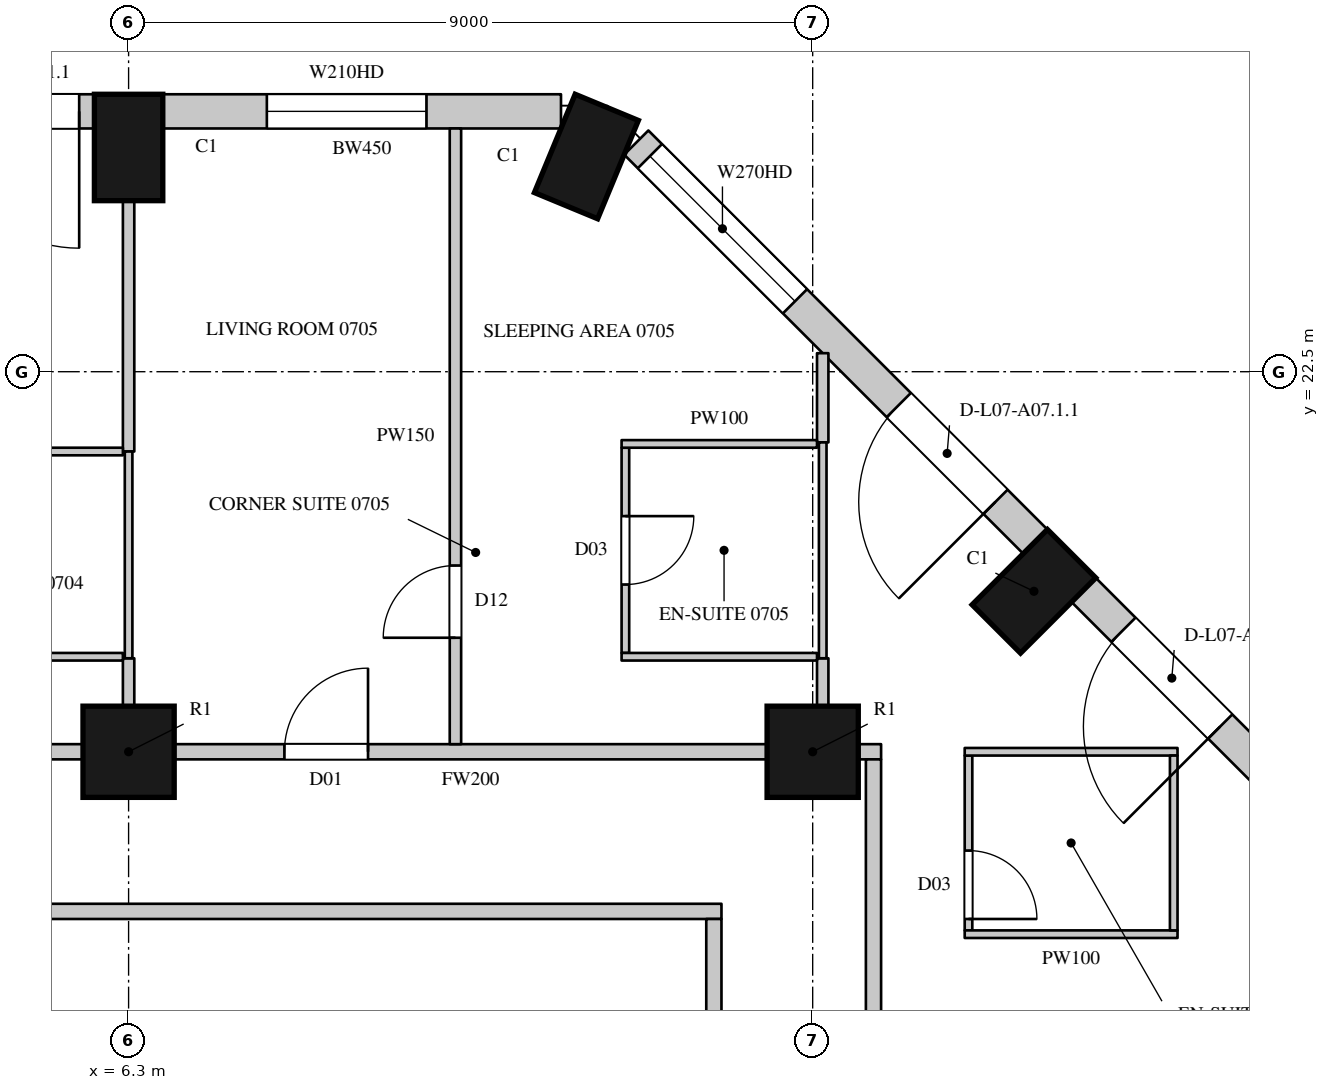
"""IFC4 building model, lengths in metres.
Left out: names, types, materials, properties, quantities, classifications, styles, units other than length and angle.
Written with IfcOpenShell. Run it as: python <this file> out.ifc"""

import sys

from ifc_helpers import new_model, si_unit, direction, frame, frame_2d, origin, origin_2d, place, context, subcontext, project, spatial, rectangle, circle, extrude, element, fill, save


model = new_model("IFC4")
c1 = context("Model", 3, precision=1e-05, world=origin(), true_north=direction((0.0, 1.0)))
c2 = subcontext(c1, "Body", "Model", "MODEL_VIEW")
j1 = project(units=[si_unit("LENGTHUNIT", "METRE"), si_unit("PLANEANGLEUNIT", "RADIAN")], contexts=[c1])
p1 = place(None, origin())
s1 = spatial("IfcSite", under=j1, at=p1, CompositionType="ELEMENT")
p2 = place(p1, origin())
s2 = spatial("IfcBuilding", under=s1, at=p2, CompositionType="ELEMENT")
p3 = place(p2, frame((0.0, 0.0, 55.5)))
s3 = spatial("IfcBuildingStorey", under=s2, at=p3, CompositionType="ELEMENT", Elevation=55.5)
for number, where, z_axis, x_axis in (
    (1, (18.211, 19.611, 0.0), (0.0, 0.0, 1.0), (-0.707, 0.707, 0.0)),
    (2, (12.323, 25.331, 0.0), (0.0, 0.0, 1.0), (-0.924, 0.383, 0.0)),
    (3, (6.3, 25.45, 0.0), (0.0, 0.0, 1.0), (-1.0, 0.0, 0.0)),
):
    element("IfcColumn", number, at=place(p3, frame(where, z_axis=z_axis, x_axis=x_axis)), inside=s3, PredefinedType="COLUMN", context=c2, shape_type="SweptSolid", body=[
        extrude(rectangle(XDim=0.9, YDim=1.4, at=origin_2d()), origin(), (0.0, 0.0, 1.0), 3.6),
    ])
for number, where, z_axis, x_axis in (
    (4, (6.3, 17.5, 0.0), (0.0, 0.0, 1.0), (1.0, 0.0, 0.0)),
    (5, (15.3, 17.5, 0.0), (0.0, 0.0, 1.0), (1.0, 0.0, 0.0)),
):
    element("IfcColumn", number, at=place(p3, frame(where, z_axis=z_axis, x_axis=x_axis)), inside=s3, PredefinedType="COLUMN", context=c2, shape_type="SweptSolid", body=[
        extrude(circle(Radius=0.6, at=origin_2d()), origin(), (0.0, 0.0, 1.0), 3.6),
    ])
p4 = place(p3, frame((24.115, 14.379, 0.0), z_axis=(0.0, 0.0, 1.0), x_axis=(-0.707106781187, 0.707106781187, 0.0)))
e6 = element("IfcWall", 6, at=p4, inside=s3, PredefinedType="SOLIDWALL", context=c2, shape_type="SweptSolid", body=[
    extrude(rectangle(XDim=7.424, YDim=0.45, at=frame_2d((3.712, 0.0))), origin(), (0.0, 0.0, 1.0), 3.3),
])
p5 = place(p4, frame((0.253, 0.0, 1.05)))
e7 = element("IfcOpeningElement", 7, at=p5, cuts=e6, PredefinedType="OPENING", context=c2, shape_type="SweptSolid", body=[
    extrude(rectangle(XDim=2.7, YDim=2.0, at=frame_2d((1.35, 1.0))), frame((0.0, 0.235, 0.0), z_axis=(0.0, -1.0, 0.0), x_axis=(1.0, 0.0, 0.0)), (0.0, 0.0, 1.0), 0.47),
])
p6 = place(p4, frame((4.884, 0.0, 0.0)))
e8 = element("IfcOpeningElement", 8, at=p6, cuts=e6, PredefinedType="OPENING", context=c2, shape_type="SweptSolid", body=[
    extrude(rectangle(XDim=1.8, YDim=2.4, at=frame_2d((0.9, 1.2))), frame((0.0, 0.235, 0.0), z_axis=(0.0, -1.0, 0.0), x_axis=(1.0, 0.0, 0.0)), (0.0, 0.0, 1.0), 0.47),
])
p7 = place(p3, frame((18.229, 20.265, 0.0), z_axis=(0.0, 0.0, 1.0), x_axis=(-0.707106781187, 0.707106781187, 0.0)))
e9 = element("IfcWall", 9, at=p7, inside=s3, PredefinedType="SOLIDWALL", context=c2, shape_type="SweptSolid", body=[
    extrude(rectangle(XDim=7.424, YDim=0.45, at=frame_2d((3.712, 0.0))), origin(), (0.0, 0.0, 1.0), 3.3),
])
p8 = place(p7, frame((0.74, 0.0, 0.0)))
e10 = element("IfcOpeningElement", 10, at=p8, cuts=e9, PredefinedType="OPENING", context=c2, shape_type="SweptSolid", body=[
    extrude(rectangle(XDim=1.8, YDim=2.4, at=frame_2d((0.9, 1.2))), frame((0.0, 0.235, 0.0), z_axis=(0.0, -1.0, 0.0), x_axis=(1.0, 0.0, 0.0)), (0.0, 0.0, 1.0), 0.47),
])
p9 = place(p7, frame((4.471, 0.0, 1.05)))
e11 = element("IfcOpeningElement", 11, at=p9, cuts=e9, PredefinedType="OPENING", context=c2, shape_type="SweptSolid", body=[
    extrude(rectangle(XDim=2.7, YDim=2.0, at=frame_2d((1.35, 1.0))), frame((0.0, 0.235, 0.0), z_axis=(0.0, -1.0, 0.0), x_axis=(1.0, 0.0, 0.0)), (0.0, 0.0, 1.0), 0.47),
])
p10 = place(p3, frame((11.989, 25.925, 0.0), z_axis=(0.0, 0.0, 1.0), x_axis=(-1.0, 0.0, 0.0)))
e12 = element("IfcWall", 12, at=p10, inside=s3, PredefinedType="SOLIDWALL", context=c2, shape_type="SweptSolid", body=[
    extrude(rectangle(XDim=5.239, YDim=0.45, at=frame_2d((2.619, 0.0))), origin(), (0.0, 0.0, 1.0), 3.3),
])
p11 = place(p10, frame((1.77, 0.0, 1.05)))
e13 = element("IfcOpeningElement", 13, at=p11, cuts=e12, PredefinedType="OPENING", context=c2, shape_type="SweptSolid", body=[
    extrude(rectangle(XDim=2.1, YDim=2.0, at=frame_2d((1.05, 1.0))), frame((0.0, 0.235, 0.0), z_axis=(0.0, -1.0, 0.0), x_axis=(1.0, 0.0, 0.0)), (0.0, 0.0, 1.0), 0.47),
])
p12 = place(p3, frame((5.85, 25.925, 0.0), z_axis=(0.0, 0.0, 1.0), x_axis=(-1.0, 0.0, 0.0)))
e14 = element("IfcWall", 14, at=p12, inside=s3, PredefinedType="SOLIDWALL", context=c2, shape_type="SweptSolid", body=[
    extrude(rectangle(XDim=8.1, YDim=0.45, at=frame_2d((4.05, 0.0))), origin(), (0.0, 0.0, 1.0), 3.3),
])
p13 = place(p12, frame((0.2, 0.0, 0.0)))
e15 = element("IfcOpeningElement", 15, at=p13, cuts=e14, PredefinedType="OPENING", context=c2, shape_type="SweptSolid", body=[
    extrude(rectangle(XDim=1.8, YDim=2.4, at=frame_2d((0.9, 1.2))), frame((0.0, 0.235, 0.0), z_axis=(0.0, -1.0, 0.0), x_axis=(1.0, 0.0, 0.0)), (0.0, 0.0, 1.0), 0.47),
])
p14 = place(p12, frame((2.2, 0.0, 1.05)))
e16 = element("IfcOpeningElement", 16, at=p14, cuts=e14, PredefinedType="OPENING", context=c2, shape_type="SweptSolid", body=[
    extrude(rectangle(XDim=1.2, YDim=2.0, at=frame_2d((0.6, 1.0))), frame((0.0, 0.235, 0.0), z_axis=(0.0, -1.0, 0.0), x_axis=(1.0, 0.0, 0.0)), (0.0, 0.0, 1.0), 0.47),
])
p15 = place(p12, frame((4.7, 0.0, 0.0)))
e17 = element("IfcOpeningElement", 17, at=p15, cuts=e14, PredefinedType="OPENING", context=c2, shape_type="SweptSolid", body=[
    extrude(rectangle(XDim=1.8, YDim=2.4, at=frame_2d((0.9, 1.2))), frame((0.0, 0.235, 0.0), z_axis=(0.0, -1.0, 0.0), x_axis=(1.0, 0.0, 0.0)), (0.0, 0.0, 1.0), 0.47),
])
p16 = place(p12, frame((6.7, 0.0, 1.05)))
e18 = element("IfcOpeningElement", 18, at=p16, cuts=e14, PredefinedType="OPENING", context=c2, shape_type="SweptSolid", body=[
    extrude(rectangle(XDim=1.2, YDim=2.0, at=frame_2d((0.6, 1.0))), frame((0.0, 0.235, 0.0), z_axis=(0.0, -1.0, 0.0), x_axis=(1.0, 0.0, 0.0)), (0.0, 0.0, 1.0), 0.47),
])
p17 = place(p3, frame((19.937, 20.078, 0.0), z_axis=(0.0, 0.0, 1.0), x_axis=(-0.707106781187, 0.707106781187, 0.0)))
e19 = element("IfcWall", 19, at=p17, inside=s3, PredefinedType="SOLIDWALL", context=c2, shape_type="SweptSolid", body=[
    extrude(rectangle(XDim=1.781, YDim=0.45, at=frame_2d((0.89, 0.0))), origin(), (0.0, 0.0, 1.0), 0.6),
])
p18 = place(p3, frame((16.486, 23.529, 0.0), z_axis=(0.0, 0.0, 1.0), x_axis=(-0.707022305137, 0.707191247145, 0.0)))
e20 = element("IfcWall", 20, at=p18, inside=s3, PredefinedType="SOLIDWALL", context=c2, shape_type="SweptSolid", body=[
    extrude(rectangle(XDim=1.445, YDim=0.45, at=frame_2d((0.723, 0.0))), origin(), (0.0, 0.0, 1.0), 0.6),
])
p19 = place(p3, frame((-2.1, 17.5, 0.0), z_axis=(0.0, 0.0, 1.0), x_axis=(1.0, 0.0, 0.0)))
e21 = element("IfcWall", 21, at=p19, inside=s3, PredefinedType="PARTITIONING", context=c2, shape_type="SweptSolid", body=[
    extrude(rectangle(XDim=7.8, YDim=0.2, at=frame_2d((3.9, 0.0))), origin(), (0.0, 0.0, 1.0), 2.75),
])
p20 = place(p19, frame((4.2, 0.0, 0.0)))
e22 = element("IfcOpeningElement", 22, at=p20, cuts=e21, PredefinedType="OPENING", context=c2, shape_type="SweptSolid", body=[
    extrude(rectangle(XDim=0.95, YDim=2.2, at=frame_2d((0.475, 1.1))), frame((0.0, 0.11, 0.0), z_axis=(0.0, -1.0, 0.0), x_axis=(1.0, 0.0, 0.0)), (0.0, 0.0, 1.0), 0.22),
])
p21 = place(p3, frame((6.9, 17.5, 0.0), z_axis=(0.0, 0.0, 1.0), x_axis=(1.0, 0.0, 0.0)))
e23 = element("IfcWall", 23, at=p21, inside=s3, PredefinedType="PARTITIONING", context=c2, shape_type="SweptSolid", body=[
    extrude(rectangle(XDim=7.8, YDim=0.2, at=frame_2d((3.9, 0.0))), origin(), (0.0, 0.0, 1.0), 2.75),
])
p22 = place(p21, frame((1.45, 0.0, 0.0)))
e24 = element("IfcOpeningElement", 24, at=p22, cuts=e23, PredefinedType="OPENING", context=c2, shape_type="SweptSolid", body=[
    extrude(rectangle(XDim=1.1, YDim=2.4, at=frame_2d((0.55, 1.2))), frame((0.0, 0.11, 0.0), z_axis=(0.0, -1.0, 0.0), x_axis=(1.0, 0.0, 0.0)), (0.0, 0.0, 1.0), 0.22),
])
p23 = place(p3, frame((15.9, 17.5, 0.0), z_axis=(0.0, 0.0, 1.0), x_axis=(1.0, 0.0, 0.0)))
e25 = element("IfcWall", 25, at=p23, inside=s3, PredefinedType="PARTITIONING", context=c2, shape_type="SweptSolid", body=[
    extrude(rectangle(XDim=0.3, YDim=0.2, at=frame_2d((0.15, 0.0))), origin(), (0.0, 0.0, 1.0), 3.3),
])
p24 = place(p3, frame((-1.6, 15.4, 0.0), z_axis=(0.0, 0.0, 1.0), x_axis=(1.0, 0.0, 0.0)))
e26 = element("IfcWall", 26, at=p24, inside=s3, PredefinedType="PARTITIONING", context=c2, shape_type="SweptSolid", body=[
    extrude(rectangle(XDim=15.7, YDim=0.2, at=frame_2d((7.85, 0.0))), origin(), (0.0, 0.0, 1.0), 3.3),
])
p25 = place(p3, frame((14.0, 6.825, 0.0), z_axis=(0.0, 0.0, 1.0), x_axis=(0.0, 1.0, 0.0)))
e27 = element("IfcWall", 27, at=p25, inside=s3, PredefinedType="PARTITIONING", context=c2, shape_type="SweptSolid", body=[
    extrude(rectangle(XDim=8.475, YDim=0.2, at=frame_2d((4.238, 0.0))), origin(), (0.0, 0.0, 1.0), 3.3),
])
p26 = place(p3, frame((16.1, 4.75, 0.0), z_axis=(0.0, 0.0, 1.0), x_axis=(0.0, 1.0, 0.0)))
e28 = element("IfcWall", 28, at=p26, inside=s3, PredefinedType="PARTITIONING", context=c2, shape_type="SweptSolid", body=[
    extrude(rectangle(XDim=12.65, YDim=0.2, at=frame_2d((6.325, 0.0))), origin(), (0.0, 0.0, 1.0), 3.3),
])
p27 = place(p26, frame((0.25, 0.0, 0.0)))
e29 = element("IfcOpeningElement", 29, at=p27, cuts=e28, PredefinedType="OPENING", context=c2, shape_type="SweptSolid", body=[
    extrude(rectangle(XDim=0.95, YDim=2.2, at=frame_2d((0.475, 1.1))), frame((0.0, 0.11, 0.0), z_axis=(0.0, -1.0, 0.0), x_axis=(1.0, 0.0, 0.0)), (0.0, 0.0, 1.0), 0.22),
])
p28 = place(p26, frame((6.9, 0.0, 0.0)))
e30 = element("IfcOpeningElement", 30, at=p28, cuts=e28, PredefinedType="OPENING", context=c2, shape_type="SweptSolid", body=[
    extrude(rectangle(XDim=0.95, YDim=2.2, at=frame_2d((0.475, 1.1))), frame((0.0, 0.11, 0.0), z_axis=(0.0, -1.0, 0.0), x_axis=(1.0, 0.0, 0.0)), (0.0, 0.0, 1.0), 0.22),
])
p29 = place(p3, frame((6.3, 18.1, 0.0), z_axis=(0.0, 0.0, 1.0), x_axis=(0.0, 1.0, 0.0)))
e31 = element("IfcWall", 31, at=p29, inside=s3, PredefinedType="PARTITIONING", context=c2, shape_type="SweptSolid", body=[
    extrude(rectangle(XDim=0.63, YDim=0.15, at=frame_2d((0.315, 0.0))), origin(), (0.0, 0.0, 1.0), 2.75),
])
p30 = place(p3, frame((6.3, 21.45, 0.0), z_axis=(0.0, 0.0, 1.0), x_axis=(0.0, 1.0, 0.0)))
e32 = element("IfcWall", 32, at=p30, inside=s3, PredefinedType="PARTITIONING", context=c2, shape_type="SweptSolid", body=[
    extrude(rectangle(XDim=3.3, YDim=0.15, at=frame_2d((1.65, 0.0))), origin(), (0.0, 0.0, 1.0), 2.75),
])
p31 = place(p3, frame((10.6, 17.6, 0.0), z_axis=(0.0, 0.0, 1.0), x_axis=(0.0, 1.0, 0.0)))
e33 = element("IfcWall", 33, at=p31, inside=s3, PredefinedType="PARTITIONING", context=c2, shape_type="SweptSolid", body=[
    extrude(rectangle(XDim=8.1, YDim=0.15, at=frame_2d((4.05, 0.0))), origin(), (0.0, 0.0, 1.0), 3.3),
])
p32 = place(p31, frame((1.4, 0.0, 0.0)))
e34 = element("IfcOpeningElement", 34, at=p32, cuts=e33, PredefinedType="OPENING", context=c2, shape_type="SweptSolid", body=[
    extrude(rectangle(XDim=0.95, YDim=2.2, at=frame_2d((0.475, 1.1))), frame((0.0, 0.085, 0.0), z_axis=(0.0, -1.0, 0.0), x_axis=(1.0, 0.0, 0.0)), (0.0, 0.0, 1.0), 0.17),
])
p33 = place(p3, frame((15.432, 18.094, 0.0), z_axis=(0.0, 0.0, 1.0), x_axis=(0.0, 1.0, 0.0)))
e35 = element("IfcWall", 35, at=p33, inside=s3, PredefinedType="PARTITIONING", context=c2, shape_type="SweptSolid", body=[
    extrude(rectangle(XDim=0.636, YDim=0.15, at=frame_2d((0.318, 0.0))), origin(), (0.0, 0.0, 1.0), 3.3),
])
p34 = place(p3, frame((15.432, 21.57, 0.0), z_axis=(0.0, 0.0, 1.0), x_axis=(0.0, 1.0, 0.0)))
e36 = element("IfcWall", 36, at=p34, inside=s3, PredefinedType="PARTITIONING", context=c2, shape_type="SweptSolid", body=[
    extrude(rectangle(XDim=1.174, YDim=0.15, at=frame_2d((0.587, 0.0))), origin(), (0.0, 0.0, 1.0), 3.3),
])
for number, where, z_axis, x_axis in (
    (37, (3.354, 18.75, 0.0), (0.0, 0.0, 1.0), (1.0, 0.0, 0.0)),
    (38, (3.354, 21.45, 0.0), (0.0, 0.0, 1.0), (1.0, 0.0, 0.0)),
):
    element("IfcWall", number, at=place(p3, frame(where, z_axis=z_axis, x_axis=x_axis)), inside=s3, PredefinedType="PARTITIONING", context=c2, shape_type="SweptSolid", body=[
        extrude(rectangle(XDim=2.871, YDim=0.1, at=frame_2d((1.436, 0.0))), origin(), (0.0, 0.0, 1.0), 3.3),
    ])
p35 = place(p3, frame((6.3, 18.73, 0.0), z_axis=(0.0, 0.0, 1.0), x_axis=(0.0, 1.0, 0.0)))
e39 = element("IfcWall", 39, at=p35, inside=s3, PredefinedType="PARTITIONING", context=c2, shape_type="SweptSolid", body=[
    extrude(rectangle(XDim=2.72, YDim=0.1, at=frame_2d((1.36, 0.0))), origin(), (0.0, 0.0, 1.0), 2.75),
])
p36 = place(p3, frame((12.836, 18.8, 0.0), z_axis=(0.0, 0.0, 1.0), x_axis=(0.0, 1.0, 0.0)))
e40 = element("IfcWall", 40, at=p36, inside=s3, PredefinedType="PARTITIONING", context=c2, shape_type="SweptSolid", body=[
    extrude(rectangle(XDim=2.7, YDim=0.1, at=frame_2d((1.35, 0.0))), origin(), (0.0, 0.0, 1.0), 3.3),
])
p37 = place(p36, frame((0.9, 0.0, 0.0)))
e41 = element("IfcOpeningElement", 41, at=p37, cuts=e40, PredefinedType="OPENING", context=c2, shape_type="SweptSolid", body=[
    extrude(rectangle(XDim=0.9, YDim=2.2, at=frame_2d((0.45, 1.1))), frame((0.0, 0.06, 0.0), z_axis=(0.0, -1.0, 0.0), x_axis=(1.0, 0.0, 0.0)), (0.0, 0.0, 1.0), 0.12),
])
for number, where, z_axis, x_axis in (
    (42, (12.786, 18.75, 0.0), (0.0, 0.0, 1.0), (1.0, 0.0, 0.0)),
    (43, (12.786, 21.55, 0.0), (0.0, 0.0, 1.0), (1.0, 0.0, 0.0)),
):
    element("IfcWall", number, at=place(p3, frame(where, z_axis=z_axis, x_axis=x_axis)), inside=s3, PredefinedType="PARTITIONING", context=c2, shape_type="SweptSolid", body=[
        extrude(rectangle(XDim=2.571, YDim=0.1, at=frame_2d((1.286, 0.0))), origin(), (0.0, 0.0, 1.0), 3.3),
    ])
p38 = place(p3, frame((15.432, 18.73, 0.0), z_axis=(0.0, 0.0, 1.0), x_axis=(0.0, 1.0, 0.0)))
e44 = element("IfcWall", 44, at=p38, inside=s3, PredefinedType="PARTITIONING", context=c2, shape_type="SweptSolid", body=[
    extrude(rectangle(XDim=2.84, YDim=0.1, at=frame_2d((1.42, 0.0))), origin(), (0.0, 0.0, 1.0), 3.3),
])
p39 = place(p3, frame((17.35, 15.15, 0.0), z_axis=(0.0, 0.0, 1.0), x_axis=(0.0, 1.0, 0.0)))
e45 = element("IfcWall", 45, at=p39, inside=s3, PredefinedType="PARTITIONING", context=c2, shape_type="SweptSolid", body=[
    extrude(rectangle(XDim=2.3, YDim=0.1, at=frame_2d((1.15, 0.0))), origin(), (0.0, 0.0, 1.0), 3.3),
])
p40 = place(p39, frame((0.15, 0.0, 0.0)))
e46 = element("IfcOpeningElement", 46, at=p40, cuts=e45, PredefinedType="OPENING", context=c2, shape_type="SweptSolid", body=[
    extrude(rectangle(XDim=0.9, YDim=2.2, at=frame_2d((0.45, 1.1))), frame((0.0, 0.06, 0.0), z_axis=(0.0, -1.0, 0.0), x_axis=(1.0, 0.0, 0.0)), (0.0, 0.0, 1.0), 0.12),
])
for number, where, z_axis, x_axis in (
    (47, (17.3, 15.1, 0.0), (0.0, 0.0, 1.0), (1.0, 0.0, 0.0)),
    (48, (17.3, 17.5, 0.0), (0.0, 0.0, 1.0), (1.0, 0.0, 0.0)),
):
    element("IfcWall", number, at=place(p3, frame(where, z_axis=z_axis, x_axis=x_axis)), inside=s3, PredefinedType="PARTITIONING", context=c2, shape_type="SweptSolid", body=[
        extrude(rectangle(XDim=2.8, YDim=0.1, at=frame_2d((1.4, 0.0))), origin(), (0.0, 0.0, 1.0), 3.3),
    ])
p41 = place(p3, frame((20.05, 15.15, 0.0), z_axis=(0.0, 0.0, 1.0), x_axis=(0.0, 1.0, 0.0)))
e49 = element("IfcWall", 49, at=p41, inside=s3, PredefinedType="PARTITIONING", context=c2, shape_type="SweptSolid", body=[
    extrude(rectangle(XDim=2.3, YDim=0.1, at=frame_2d((1.15, 0.0))), origin(), (0.0, 0.0, 1.0), 3.3),
])
p42 = place(p6, origin())
e50 = element("IfcDoor", 50, at=p42, inside=s3, OperationType="SLIDING_TO_LEFT", PredefinedType="DOOR", context=c2, shape_type="SweptSolid", body=[
    extrude(rectangle(XDim=1.8, YDim=2.4, at=frame_2d((0.9, 1.2))), frame((0.0, 0.13, 0.0), z_axis=(0.0, -1.0, 0.0), x_axis=(1.0, 0.0, 0.0)), (0.0, 0.0, 1.0), 0.05),
])
fill(e8, e50)
p43 = place(p8, origin())
e51 = element("IfcDoor", 51, at=p43, inside=s3, OperationType="SLIDING_TO_LEFT", PredefinedType="DOOR", context=c2, shape_type="SweptSolid", body=[
    extrude(rectangle(XDim=1.8, YDim=2.4, at=frame_2d((0.9, 1.2))), frame((0.0, 0.13, 0.0), z_axis=(0.0, -1.0, 0.0), x_axis=(1.0, 0.0, 0.0)), (0.0, 0.0, 1.0), 0.05),
])
fill(e10, e51)
p44 = place(p9, origin())
e52 = element("IfcWindow", 52, at=p44, inside=s3, PartitioningType="SINGLE_PANEL", PredefinedType="WINDOW", context=c2, shape_type="SweptSolid", body=[
    extrude(rectangle(XDim=2.7, YDim=2.0, at=frame_2d((1.35, 1.0))), frame((0.0, 0.135, 0.0), z_axis=(0.0, -1.0, 0.0), x_axis=(1.0, 0.0, 0.0)), (0.0, 0.0, 1.0), 0.06),
])
fill(e11, e52)
p45 = place(p13, origin())
e53 = element("IfcDoor", 53, at=p45, inside=s3, OperationType="SLIDING_TO_LEFT", PredefinedType="DOOR", context=c2, shape_type="SweptSolid", body=[
    extrude(rectangle(XDim=1.8, YDim=2.4, at=frame_2d((0.9, 1.2))), frame((0.0, 0.13, 0.0), z_axis=(0.0, -1.0, 0.0), x_axis=(1.0, 0.0, 0.0)), (0.0, 0.0, 1.0), 0.05),
])
fill(e15, e53)
p46 = place(p22, origin())
e54 = element("IfcDoor", 54, at=p46, inside=s3, OperationType="SINGLE_SWING_RIGHT", PredefinedType="DOOR", context=c2, shape_type="SweptSolid", body=[
    extrude(rectangle(XDim=1.1, YDim=2.4, at=frame_2d((0.55, 1.2))), frame((0.0, 0.025, 0.0), z_axis=(0.0, -1.0, 0.0), x_axis=(1.0, 0.0, 0.0)), (0.0, 0.0, 1.0), 0.05),
])
fill(e24, e54)
p47 = place(p32, origin())
e55 = element("IfcDoor", 55, at=p47, inside=s3, OperationType="SINGLE_SWING_LEFT", PredefinedType="DOOR", context=c2, shape_type="SweptSolid", body=[
    extrude(rectangle(XDim=0.95, YDim=2.2, at=frame_2d((0.475, 1.1))), frame((0.0, 0.025, 0.0), z_axis=(0.0, -1.0, 0.0), x_axis=(1.0, 0.0, 0.0)), (0.0, 0.0, 1.0), 0.05),
])
fill(e34, e55)
p48 = place(p37, origin())
e56 = element("IfcDoor", 56, at=p48, inside=s3, OperationType="SINGLE_SWING_LEFT", PredefinedType="DOOR", context=c2, shape_type="SweptSolid", body=[
    extrude(rectangle(XDim=0.9, YDim=2.2, at=frame_2d((0.45, 1.1))), frame((0.0, 0.025, 0.0), z_axis=(0.0, -1.0, 0.0), x_axis=(1.0, 0.0, 0.0)), (0.0, 0.0, 1.0), 0.05),
])
fill(e41, e56)
p49 = place(p40, origin())
e57 = element("IfcDoor", 57, at=p49, inside=s3, OperationType="SINGLE_SWING_RIGHT", PredefinedType="DOOR", context=c2, shape_type="SweptSolid", body=[
    extrude(rectangle(XDim=0.9, YDim=2.2, at=frame_2d((0.45, 1.1))), frame((0.0, 0.025, 0.0), z_axis=(0.0, -1.0, 0.0), x_axis=(1.0, 0.0, 0.0)), (0.0, 0.0, 1.0), 0.05),
])
fill(e46, e57)
p50 = place(p11, origin())
e58 = element("IfcWindow", 58, at=p50, inside=s3, PartitioningType="SINGLE_PANEL", PredefinedType="WINDOW", context=c2, shape_type="SweptSolid", body=[
    extrude(rectangle(XDim=2.1, YDim=2.0, at=frame_2d((1.05, 1.0))), frame((0.0, 0.135, 0.0), z_axis=(0.0, -1.0, 0.0), x_axis=(1.0, 0.0, 0.0)), (0.0, 0.0, 1.0), 0.06),
])
fill(e13, e58)
save(model, sys.argv[1])
